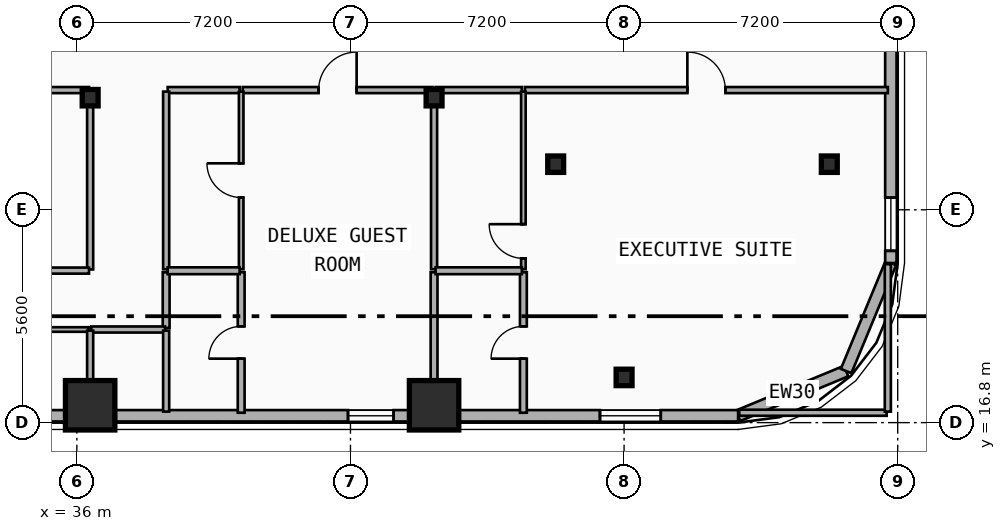
"""IFC4 building model, lengths in metres.
Left out: names, types, materials, properties, quantities, classifications, styles, units other than length and angle.
Written with IfcOpenShell. Run it as: python <this file> out.ifc"""

import sys

from ifc_helpers import new_model, si_unit, direction, frame, frame_2d, origin, origin_2d, place, context, subcontext, project, spatial, rectangle, i_section, extrude, element, fill, save


model = new_model("IFC4")
c1 = context("Model", 3, precision=1e-05, world=origin(), true_north=direction((0.0, 1.0)))
c2 = subcontext(c1, "Body", "Model", "MODEL_VIEW")
j1 = project(units=[si_unit("LENGTHUNIT", "METRE"), si_unit("PLANEANGLEUNIT", "RADIAN")], contexts=[c1])
p1 = place(None, origin())
s1 = spatial("IfcSite", under=j1, at=p1, CompositionType="ELEMENT")
p2 = place(p1, origin())
s2 = spatial("IfcBuilding", under=s1, at=p2, CompositionType="ELEMENT")
p3 = place(p2, frame((0.0, 0.0, 97.8)))
s3 = spatial("IfcBuildingStorey", under=s2, at=p3, CompositionType="ELEMENT", Elevation=97.8)
for number, where, z_axis, x_axis in (
    (1, (36.35, 25.35, 0.0), (0.0, 0.0, 1.0), (1.0, 0.0, 0.0)),
    (2, (45.4, 25.35, 0.0), (0.0, 0.0, 1.0), (1.0, 0.0, 0.0)),
):
    element("IfcColumn", number, at=place(p3, frame(where, z_axis=z_axis, x_axis=x_axis)), inside=s3, PredefinedType="COLUMN", context=c2, shape_type="SweptSolid", body=[
        extrude(i_section(OverallWidth=0.418, OverallDepth=0.432, WebThickness=0.035, FlangeThickness=0.056, FilletRadius=0.015, at=origin_2d()), origin(), (0.0, 0.0, 1.0), 3.5),
    ])
for number, where, z_axis, x_axis in (
    (3, (36.35, 17.365, 0.0), (0.0, -0.09, 0.996), (1.0, 0.0, 0.0)),
    (4, (45.4, 17.365, 0.0), (0.0, -0.09, 0.996), (1.0, 0.0, 0.0)),
):
    element("IfcColumn", number, at=place(p3, frame(where, z_axis=z_axis, x_axis=x_axis)), inside=s3, PredefinedType="COLUMN", context=c2, shape_type="SweptSolid", body=[
        extrude(rectangle(XDim=1.3, YDim=1.3, at=origin_2d()), origin(), (0.0, 0.0, 1.0), 3.514),
    ])
p4 = place(p3, frame((48.6, 23.6, 0.0), z_axis=(0.0, 0.0, 1.0), x_axis=(1.0, 0.0, 0.0)))
e5 = element("IfcColumn", 5, at=p4, inside=s3, PredefinedType="COLUMN", context=c2, shape_type="SweptSolid", body=[
    extrude(i_section(OverallWidth=0.418, OverallDepth=0.432, WebThickness=0.035, FlangeThickness=0.056, FilletRadius=0.015, at=origin_2d()), origin(), (0.0, 0.0, 1.0), 3.5),
])
p5 = place(p3, frame((50.4, 18.086, 0.0), z_axis=(0.0, -0.079891690793, 0.996803550226), x_axis=(1.0, 0.0, 0.0)))
e6 = element("IfcColumn", 6, at=p5, inside=s3, PredefinedType="COLUMN", context=c2, shape_type="SweptSolid", body=[
    extrude(i_section(OverallWidth=0.418, OverallDepth=0.432, WebThickness=0.035, FlangeThickness=0.056, FilletRadius=0.015, at=origin_2d()), origin(), (0.0, 0.0, 1.0), 3.511),
])
p6 = place(p3, frame((55.8, 23.6, 0.0), z_axis=(0.0, 0.0, 1.0), x_axis=(1.0, 0.0, 0.0)))
e7 = element("IfcColumn", 7, at=p6, inside=s3, PredefinedType="COLUMN", context=c2, shape_type="SweptSolid", body=[
    extrude(i_section(OverallWidth=0.418, OverallDepth=0.432, WebThickness=0.035, FlangeThickness=0.056, FilletRadius=0.015, at=origin_2d()), origin(), (0.0, 0.0, 1.0), 3.5),
])
p7 = place(p3, frame((56.243, 18.157, 0.0), z_axis=(0.0, 0.0, 1.0), x_axis=(-0.923882414032, -0.382676475685, 0.0)))
e8 = element("IfcWall", 8, at=p7, inside=s3, PredefinedType="SOLIDWALL", context=c2, shape_type="SweptSolid", body=[
    extrude(rectangle(XDim=3.077, YDim=0.3, at=frame_2d((1.539, 0.0))), origin(), (0.0, 0.0, 1.0), 3.24),
])
p8 = place(p3, frame((57.42, 21.0, 0.0), z_axis=(0.0, 0.0, 1.0), x_axis=(-0.382636798336, -0.92389884758, 0.0)))
e9 = element("IfcWall", 9, at=p8, inside=s3, PredefinedType="SOLIDWALL", context=c2, shape_type="SweptSolid", body=[
    extrude(rectangle(XDim=3.077, YDim=0.3, at=frame_2d((1.538, 0.0))), origin(), (0.0, 0.0, 1.0), 3.24),
])
p9 = place(p3, frame((57.42, 39.0, 0.0), z_axis=(0.0, 0.0, 1.0), x_axis=(0.0, -1.0, 0.0)))
e10 = element("IfcWall", 10, at=p9, inside=s3, PredefinedType="SOLIDWALL", context=c2, shape_type="SweptSolid", body=[
    extrude(rectangle(XDim=18.0, YDim=0.3, at=frame_2d((9.0, 0.0))), origin(), (0.0, 0.0, 1.0), 3.24),
])
p10 = place(p9, frame((8.882, 0.0, 0.48)))
e11 = element("IfcOpeningElement", 11, at=p10, cuts=e10, PredefinedType="OPENING", context=c2, shape_type="SweptSolid", body=[
    extrude(rectangle(XDim=1.4, YDim=1.8, at=frame_2d((0.7, 0.9))), frame((0.0, 0.16, 0.0), z_axis=(0.0, -1.0, 0.0), x_axis=(1.0, 0.0, 0.0)), (0.0, 0.0, 1.0), 0.32),
])
p11 = place(p9, frame((3.621, 0.0, 0.48)))
e12 = element("IfcOpeningElement", 12, at=p11, cuts=e10, PredefinedType="OPENING", context=c2, shape_type="SweptSolid", body=[
    extrude(rectangle(XDim=1.4, YDim=1.8, at=frame_2d((0.7, 0.9))), frame((0.0, 0.16, 0.0), z_axis=(0.0, -1.0, 0.0), x_axis=(1.0, 0.0, 0.0)), (0.0, 0.0, 1.0), 0.32),
])
p12 = place(p9, frame((16.28, 0.0, 0.65)))
e13 = element("IfcOpeningElement", 13, at=p12, cuts=e10, PredefinedType="OPENING", context=c2, shape_type="SweptSolid", body=[
    extrude(rectangle(XDim=1.4, YDim=1.8, at=frame_2d((0.7, 0.9))), frame((0.0, 0.16, 0.0), z_axis=(0.0, -1.0, 0.0), x_axis=(1.0, 0.0, 0.0)), (0.0, 0.0, 1.0), 0.32),
])
p13 = place(p3, frame((53.4, 16.98, 0.0), z_axis=(0.0, 0.0, 1.0), x_axis=(-1.0, 0.0, 0.0)))
e14 = element("IfcWall", 14, at=p13, inside=s3, PredefinedType="SOLIDWALL", context=c2, shape_type="SweptSolid", body=[
    extrude(rectangle(XDim=49.2, YDim=0.3, at=frame_2d((24.6, 0.0))), origin(), (0.0, 0.0, 1.0), 2.86),
])
p14 = place(p13, frame((45.565, 0.0, 0.48)))
e15 = element("IfcOpeningElement", 15, at=p14, cuts=e14, PredefinedType="OPENING", context=c2, shape_type="SweptSolid", body=[
    extrude(rectangle(XDim=1.6, YDim=1.95, at=frame_2d((0.8, 0.975))), frame((0.0, 0.16, 0.0), z_axis=(0.0, -1.0, 0.0), x_axis=(1.0, 0.0, 0.0)), (0.0, 0.0, 1.0), 0.32),
])
p15 = place(p13, frame((33.165, 0.0, 0.48)))
e16 = element("IfcOpeningElement", 16, at=p15, cuts=e14, PredefinedType="OPENING", context=c2, shape_type="SweptSolid", body=[
    extrude(rectangle(XDim=1.2, YDim=1.5, at=frame_2d((0.6, 0.75))), frame((0.0, 0.16, 0.0), z_axis=(0.0, -1.0, 0.0), x_axis=(1.0, 0.0, 0.0)), (0.0, 0.0, 1.0), 0.32),
])
p16 = place(p13, frame((20.025, 0.0, 0.73)))
e17 = element("IfcOpeningElement", 17, at=p16, cuts=e14, PredefinedType="OPENING", context=c2, shape_type="SweptSolid", body=[
    extrude(rectangle(XDim=1.6, YDim=1.95, at=frame_2d((0.8, 0.975))), frame((0.0, 0.16, 0.0), z_axis=(0.0, -1.0, 0.0), x_axis=(1.0, 0.0, 0.0)), (0.0, 0.0, 1.0), 0.32),
])
p17 = place(p13, frame((9.065, 0.0, 0.48)))
e18 = element("IfcOpeningElement", 18, at=p17, cuts=e14, PredefinedType="OPENING", context=c2, shape_type="SweptSolid", body=[
    extrude(rectangle(XDim=1.2, YDim=1.5, at=frame_2d((0.6, 0.75))), frame((0.0, 0.16, 0.0), z_axis=(0.0, -1.0, 0.0), x_axis=(1.0, 0.0, 0.0)), (0.0, 0.0, 1.0), 0.32),
])
p18 = place(p13, frame((2.035, 0.0, 0.48)))
e19 = element("IfcOpeningElement", 19, at=p18, cuts=e14, PredefinedType="OPENING", context=c2, shape_type="SweptSolid", body=[
    extrude(rectangle(XDim=1.6, YDim=1.95, at=frame_2d((0.8, 0.975))), frame((0.0, 0.16, 0.0), z_axis=(0.0, -1.0, 0.0), x_axis=(1.0, 0.0, 0.0)), (0.0, 0.0, 1.0), 0.32),
])
p19 = place(p3, frame((40.364, 25.55, 0.0), z_axis=(0.0, 0.0, 1.0), x_axis=(1.0, 0.0, 0.0)))
e20 = element("IfcWall", 20, at=p19, inside=s3, PredefinedType="PARTITIONING", context=c2, shape_type="SweptSolid", body=[
    extrude(rectangle(XDim=4.996, YDim=0.16, at=frame_2d((2.498, 0.0))), origin(), (0.0, 0.0, 1.0), 2.31),
])
p20 = place(p19, frame((1.998, 0.0, 0.0)))
e21 = element("IfcOpeningElement", 21, at=p20, cuts=e20, PredefinedType="OPENING", context=c2, shape_type="SweptSolid", body=[
    extrude(rectangle(XDim=1.0, YDim=2.15, at=frame_2d((0.5, 1.075))), frame((0.0, 0.09, 0.0), z_axis=(0.0, -1.0, 0.0), x_axis=(1.0, 0.0, 0.0)), (0.0, 0.0, 1.0), 0.18),
])
p21 = place(p3, frame((38.39, 25.55, 0.0), z_axis=(0.0, 0.0, 1.0), x_axis=(1.0, 0.0, 0.0)))
e22 = element("IfcWall", 22, at=p21, inside=s3, PredefinedType="PARTITIONING", context=c2, shape_type="SweptSolid", body=[
    extrude(rectangle(XDim=1.894, YDim=0.16, at=frame_2d((0.947, 0.0))), origin(), (0.0, 0.0, 1.0), 3.24),
])
p22 = place(p3, frame((47.79, 25.55, 0.0), z_axis=(0.0, 0.0, 1.0), x_axis=(1.0, 0.0, 0.0)))
e23 = element("IfcWall", 23, at=p22, inside=s3, PredefinedType="PARTITIONING", context=c2, shape_type="SweptSolid", body=[
    extrude(rectangle(XDim=9.55, YDim=0.16, at=frame_2d((4.775, 0.0))), origin(), (0.0, 0.0, 1.0), 2.57),
])
p23 = place(p22, frame((4.275, 0.0, 0.0)))
e24 = element("IfcOpeningElement", 24, at=p23, cuts=e23, PredefinedType="OPENING", context=c2, shape_type="SweptSolid", body=[
    extrude(rectangle(XDim=1.0, YDim=2.15, at=frame_2d((0.5, 1.075))), frame((0.0, 0.09, 0.0), z_axis=(0.0, -1.0, 0.0), x_axis=(1.0, 0.0, 0.0)), (0.0, 0.0, 1.0), 0.18),
])
p24 = place(p3, frame((45.44, 25.55, 0.0), z_axis=(0.0, 0.0, 1.0), x_axis=(1.0, 0.0, 0.0)))
e25 = element("IfcWall", 25, at=p24, inside=s3, PredefinedType="PARTITIONING", context=c2, shape_type="SweptSolid", body=[
    extrude(rectangle(XDim=2.27, YDim=0.16, at=frame_2d((1.135, 0.0))), origin(), (0.0, 0.0, 1.0), 2.31),
])
p25 = place(p3, frame((38.35, 19.29, 0.0), z_axis=(0.0, 0.0, 1.0), x_axis=(0.0, 1.0, 0.0)))
e26 = element("IfcWall", 26, at=p25, inside=s3, PredefinedType="PLUMBINGWALL", context=c2, shape_type="SweptSolid", body=[
    extrude(rectangle(XDim=1.466, YDim=0.18, at=frame_2d((0.733, 0.0))), origin(), (0.0, 0.0, 1.0), 2.82),
])
p26 = place(p3, frame((38.35, 20.836, 0.0), z_axis=(0.0, 0.0, 1.0), x_axis=(0.0, 1.0, 0.0)))
e27 = element("IfcWall", 27, at=p26, inside=s3, PredefinedType="PARTITIONING", context=c2, shape_type="SweptSolid", body=[
    extrude(rectangle(XDim=4.674, YDim=0.16, at=frame_2d((2.337, 0.0))), origin(), (0.0, 0.0, 1.0), 2.82),
])
p27 = place(p3, frame((22.84, 19.25, 0.0), z_axis=(0.0, 0.0, 1.0), x_axis=(1.0, 0.0, 0.0)))
e28 = element("IfcWall", 28, at=p27, inside=s3, PredefinedType="PARTITIONING", context=c2, shape_type="SweptSolid", body=[
    extrude(rectangle(XDim=13.47, YDim=0.12, at=frame_2d((6.735, 0.0))), origin(), (0.0, 0.0, 1.0), 2.31),
])
p28 = place(p27, frame((0.652, 0.0, 0.0)))
e29 = element("IfcOpeningElement", 29, at=p28, cuts=e28, PredefinedType="OPENING", context=c2, shape_type="SweptSolid", body=[
    extrude(rectangle(XDim=0.9, YDim=2.1, at=frame_2d((0.45, 1.05))), frame((0.0, 0.07, 0.0), z_axis=(0.0, -1.0, 0.0), x_axis=(1.0, 0.0, 0.0)), (0.0, 0.0, 1.0), 0.14),
])
p29 = place(p3, frame((40.324, 17.06, 0.0), z_axis=(0.0, 0.0, 1.0), x_axis=(0.0, 1.0, 0.0)))
e30 = element("IfcWall", 30, at=p29, inside=s3, PredefinedType="PLUMBINGWALL", context=c2, shape_type="SweptSolid", body=[
    extrude(rectangle(XDim=3.696, YDim=0.18, at=frame_2d((1.848, 0.0))), origin(), (0.0, 0.0, 1.0), 2.82),
])
p30 = place(p29, frame((1.423, 0.0, 0.0)))
e31 = element("IfcOpeningElement", 31, at=p30, cuts=e30, PredefinedType="OPENING", context=c2, shape_type="SweptSolid", body=[
    extrude(rectangle(XDim=0.85, YDim=2.1, at=frame_2d((0.425, 1.05))), frame((0.0, 0.1, 0.0), z_axis=(0.0, -1.0, 0.0), x_axis=(1.0, 0.0, 0.0)), (0.0, 0.0, 1.0), 0.2),
])
p31 = place(p3, frame((40.324, 20.836, 0.0), z_axis=(0.0, 0.0, 1.0), x_axis=(0.0, 1.0, 0.0)))
e32 = element("IfcWall", 32, at=p31, inside=s3, PredefinedType="PARTITIONING", context=c2, shape_type="SweptSolid", body=[
    extrude(rectangle(XDim=4.674, YDim=0.12, at=frame_2d((2.337, 0.0))), origin(), (0.0, 0.0, 1.0), 2.82),
])
p32 = place(p31, frame((1.887, 0.0, 0.0)))
e33 = element("IfcOpeningElement", 33, at=p32, cuts=e32, PredefinedType="OPENING", context=c2, shape_type="SweptSolid", body=[
    extrude(rectangle(XDim=0.9, YDim=2.1, at=frame_2d((0.45, 1.05))), frame((0.0, 0.07, 0.0), z_axis=(0.0, -1.0, 0.0), x_axis=(1.0, 0.0, 0.0)), (0.0, 0.0, 1.0), 0.14),
])
p33 = place(p3, frame((45.4, 17.06, 0.0), z_axis=(0.0, 0.0, 1.0), x_axis=(0.0, 1.0, 0.0)))
e34 = element("IfcWall", 34, at=p33, inside=s3, PredefinedType="PLUMBINGWALL", context=c2, shape_type="SweptSolid", body=[
    extrude(rectangle(XDim=3.696, YDim=0.18, at=frame_2d((1.848, 0.0))), origin(), (0.0, 0.0, 1.0), 2.31),
])
p34 = place(p3, frame((45.4, 20.836, 0.0), z_axis=(0.0, 0.0, 1.0), x_axis=(0.0, 1.0, 0.0)))
e35 = element("IfcWall", 35, at=p34, inside=s3, PredefinedType="PARTITIONING", context=c2, shape_type="SweptSolid", body=[
    extrude(rectangle(XDim=4.674, YDim=0.16, at=frame_2d((2.337, 0.0))), origin(), (0.0, 0.0, 1.0), 2.31),
])
p35 = place(p3, frame((38.39, 20.796, 0.0), z_axis=(0.0, 0.0, 1.0), x_axis=(1.0, 0.0, 0.0)))
e36 = element("IfcWall", 36, at=p35, inside=s3, PredefinedType="PLUMBINGWALL", context=c2, shape_type="SweptSolid", body=[
    extrude(rectangle(XDim=1.894, YDim=0.18, at=frame_2d((0.947, 0.0))), origin(), (0.0, 0.0, 1.0), 2.82),
])
p36 = place(p3, frame((47.75, 17.06, 0.0), z_axis=(0.0, 0.0, 1.0), x_axis=(0.0, 1.0, 0.0)))
e37 = element("IfcWall", 37, at=p36, inside=s3, PredefinedType="PLUMBINGWALL", context=c2, shape_type="SweptSolid", body=[
    extrude(rectangle(XDim=3.696, YDim=0.18, at=frame_2d((1.848, 0.0))), origin(), (0.0, 0.0, 1.0), 2.86),
])
p37 = place(p36, frame((1.423, 0.0, 0.0)))
e38 = element("IfcOpeningElement", 38, at=p37, cuts=e37, PredefinedType="OPENING", context=c2, shape_type="SweptSolid", body=[
    extrude(rectangle(XDim=0.85, YDim=2.1, at=frame_2d((0.425, 1.05))), frame((0.0, 0.1, 0.0), z_axis=(0.0, -1.0, 0.0), x_axis=(1.0, 0.0, 0.0)), (0.0, 0.0, 1.0), 0.2),
])
p38 = place(p3, frame((47.75, 20.836, 0.0), z_axis=(0.0, 0.0, 1.0), x_axis=(0.0, 1.0, 0.0)))
e39 = element("IfcWall", 39, at=p38, inside=s3, PredefinedType="PARTITIONING", context=c2, shape_type="SweptSolid", body=[
    extrude(rectangle(XDim=4.674, YDim=0.12, at=frame_2d((2.337, 0.0))), origin(), (0.0, 0.0, 1.0), 2.72),
])
p39 = place(p38, frame((0.286, 0.0, 0.0)))
e40 = element("IfcOpeningElement", 40, at=p39, cuts=e39, PredefinedType="OPENING", context=c2, shape_type="SweptSolid", body=[
    extrude(rectangle(XDim=0.9, YDim=2.1, at=frame_2d((0.45, 1.05))), frame((0.0, 0.07, 0.0), z_axis=(0.0, -1.0, 0.0), x_axis=(1.0, 0.0, 0.0)), (0.0, 0.0, 1.0), 0.14),
])
p40 = place(p3, frame((45.44, 20.796, 0.0), z_axis=(0.0, 0.0, 1.0), x_axis=(1.0, 0.0, 0.0)))
e41 = element("IfcWall", 41, at=p40, inside=s3, PredefinedType="PLUMBINGWALL", context=c2, shape_type="SweptSolid", body=[
    extrude(rectangle(XDim=2.27, YDim=0.18, at=frame_2d((1.135, 0.0))), origin(), (0.0, 0.0, 1.0), 2.31),
])
p41 = place(p3, frame((22.83, 25.55, 0.0), z_axis=(0.0, 0.0, 1.0), x_axis=(1.0, 0.0, 0.0)))
e42 = element("IfcWall", 42, at=p41, inside=s3, PredefinedType="PARTITIONING", context=c2, shape_type="SweptSolid", body=[
    extrude(rectangle(XDim=13.49, YDim=0.16, at=frame_2d((6.745, 0.0))), origin(), (0.0, 0.0, 1.0), 2.31),
])
p42 = place(p3, frame((36.38, 19.25, 0.0), z_axis=(0.0, 0.0, 1.0), x_axis=(1.0, 0.0, 0.0)))
e43 = element("IfcWall", 43, at=p42, inside=s3, PredefinedType="PARTITIONING", context=c2, shape_type="SweptSolid", body=[
    extrude(rectangle(XDim=1.94, YDim=0.16, at=frame_2d((0.97, 0.0))), origin(), (0.0, 0.0, 1.0), 2.31),
])
p43 = place(p3, frame((36.35, 20.83, 0.0), z_axis=(0.0, 0.0, 1.0), x_axis=(0.0, 1.0, 0.0)))
e44 = element("IfcWall", 44, at=p43, inside=s3, PredefinedType="PARTITIONING", context=c2, shape_type="SweptSolid", body=[
    extrude(rectangle(XDim=4.69, YDim=0.16, at=frame_2d((2.345, 0.0))), origin(), (0.0, 0.0, 1.0), 2.31),
])
p44 = place(p3, frame((34.48, 20.8, 0.0), z_axis=(0.0, 0.0, 1.0), x_axis=(1.0, 0.0, 0.0)))
e45 = element("IfcWall", 45, at=p44, inside=s3, PredefinedType="PARTITIONING", context=c2, shape_type="SweptSolid", body=[
    extrude(rectangle(XDim=1.84, YDim=0.16, at=frame_2d((0.92, 0.0))), origin(), (0.0, 0.0, 1.0), 2.31),
])
p45 = place(p3, frame((36.35, 17.09, 0.0), z_axis=(0.0, 0.0, 1.0), x_axis=(0.0, 1.0, 0.0)))
e46 = element("IfcWall", 46, at=p45, inside=s3, PredefinedType="PARTITIONING", context=c2, shape_type="SweptSolid", body=[
    extrude(rectangle(XDim=2.13, YDim=0.16, at=frame_2d((1.065, 0.0))), origin(), (0.0, 0.0, 1.0), 2.31),
])
p46 = place(p3, frame((38.35, 17.09, 0.0), z_axis=(0.0, 0.0, 1.0), x_axis=(0.0, 1.0, 0.0)))
e47 = element("IfcWall", 47, at=p46, inside=s3, PredefinedType="PARTITIONING", context=c2, shape_type="SweptSolid", body=[
    extrude(rectangle(XDim=2.13, YDim=0.16, at=frame_2d((1.065, 0.0))), origin(), (0.0, 0.0, 1.0), 2.86),
])
p47 = place(p3, frame((53.43, 17.06, 0.0), z_axis=(0.0, 0.0, 1.0), x_axis=(1.0, 0.0, 0.0)))
e48 = element("IfcWall", 48, at=p47, inside=s3, PredefinedType="PARTITIONING", context=c2, shape_type="SweptSolid", body=[
    extrude(rectangle(XDim=3.88, YDim=0.16, at=frame_2d((1.94, 0.0))), origin(), (0.0, 0.0, 1.0), 3.24),
])
p48 = place(p3, frame((57.34, 17.09, 0.0), z_axis=(0.0, 0.0, 1.0), x_axis=(0.0, 1.0, 0.0)))
e49 = element("IfcWall", 49, at=p48, inside=s3, PredefinedType="PARTITIONING", context=c2, shape_type="SweptSolid", body=[
    extrude(rectangle(XDim=3.88, YDim=0.16, at=frame_2d((1.94, 0.0))), origin(), (0.0, 0.0, 1.0), 3.24),
])
p49 = place(p12, origin())
e50 = element("IfcWindow", 50, at=p49, inside=s3, PartitioningType="SINGLE_PANEL", PredefinedType="WINDOW", context=c2, shape_type="SweptSolid", body=[
    extrude(rectangle(XDim=1.4, YDim=1.8, at=frame_2d((0.7, 0.9))), frame((0.0, 0.03, 0.0), z_axis=(0.0, -1.0, 0.0), x_axis=(1.0, 0.0, 0.0)), (0.0, 0.0, 1.0), 0.06),
])
fill(e13, e50)
p50 = place(p17, origin())
e51 = element("IfcWindow", 51, at=p50, inside=s3, PartitioningType="SINGLE_PANEL", PredefinedType="WINDOW", context=c2, shape_type="SweptSolid", body=[
    extrude(rectangle(XDim=1.2, YDim=1.5, at=frame_2d((0.6, 0.75))), frame((0.0, 0.03, 0.0), z_axis=(0.0, -1.0, 0.0), x_axis=(1.0, 0.0, 0.0)), (0.0, 0.0, 1.0), 0.06),
])
fill(e18, e51)
p51 = place(p18, origin())
e52 = element("IfcWindow", 52, at=p51, inside=s3, PartitioningType="SINGLE_PANEL", PredefinedType="WINDOW", context=c2, shape_type="SweptSolid", body=[
    extrude(rectangle(XDim=1.6, YDim=1.95, at=frame_2d((0.8, 0.975))), frame((0.0, 0.03, 0.0), z_axis=(0.0, -1.0, 0.0), x_axis=(1.0, 0.0, 0.0)), (0.0, 0.0, 1.0), 0.06),
])
fill(e19, e52)
p52 = place(p20, origin())
e53 = element("IfcDoor", 53, at=p52, inside=s3, OperationType="SINGLE_SWING_RIGHT", PredefinedType="DOOR", context=c2, shape_type="SweptSolid", body=[
    extrude(rectangle(XDim=1.0, YDim=2.15, at=frame_2d((0.5, 1.075))), frame((0.0, 0.025, 0.0), z_axis=(0.0, -1.0, 0.0), x_axis=(1.0, 0.0, 0.0)), (0.0, 0.0, 1.0), 0.05),
])
fill(e21, e53)
p53 = place(p23, origin())
e54 = element("IfcDoor", 54, at=p53, inside=s3, OperationType="SINGLE_SWING_LEFT", PredefinedType="DOOR", context=c2, shape_type="SweptSolid", body=[
    extrude(rectangle(XDim=1.0, YDim=2.15, at=frame_2d((0.5, 1.075))), frame((0.0, 0.025, 0.0), z_axis=(0.0, -1.0, 0.0), x_axis=(1.0, 0.0, 0.0)), (0.0, 0.0, 1.0), 0.05),
])
fill(e24, e54)
p54 = place(p30, origin())
e55 = element("IfcDoor", 55, at=p54, inside=s3, OperationType="SINGLE_SWING_LEFT", PredefinedType="DOOR", context=c2, shape_type="SweptSolid", body=[
    extrude(rectangle(XDim=0.85, YDim=2.1, at=frame_2d((0.425, 1.05))), frame((0.0, 0.025, 0.0), z_axis=(0.0, -1.0, 0.0), x_axis=(1.0, 0.0, 0.0)), (0.0, 0.0, 1.0), 0.05),
])
fill(e31, e55)
p55 = place(p32, origin())
e56 = element("IfcDoor", 56, at=p55, inside=s3, OperationType="SINGLE_SWING_RIGHT", PredefinedType="DOOR", context=c2, shape_type="SweptSolid", body=[
    extrude(rectangle(XDim=0.9, YDim=2.1, at=frame_2d((0.45, 1.05))), frame((0.0, 0.025, 0.0), z_axis=(0.0, -1.0, 0.0), x_axis=(1.0, 0.0, 0.0)), (0.0, 0.0, 1.0), 0.05),
])
fill(e33, e56)
p56 = place(p37, origin())
e57 = element("IfcDoor", 57, at=p56, inside=s3, OperationType="SINGLE_SWING_LEFT", PredefinedType="DOOR", context=c2, shape_type="SweptSolid", body=[
    extrude(rectangle(XDim=0.85, YDim=2.1, at=frame_2d((0.425, 1.05))), frame((0.0, 0.025, 0.0), z_axis=(0.0, -1.0, 0.0), x_axis=(1.0, 0.0, 0.0)), (0.0, 0.0, 1.0), 0.05),
])
fill(e38, e57)
p57 = place(p39, origin())
e58 = element("IfcDoor", 58, at=p57, inside=s3, OperationType="SINGLE_SWING_RIGHT", PredefinedType="DOOR", context=c2, shape_type="SweptSolid", body=[
    extrude(rectangle(XDim=0.9, YDim=2.1, at=frame_2d((0.45, 1.05))), frame((0.0, 0.025, 0.0), z_axis=(0.0, -1.0, 0.0), x_axis=(1.0, 0.0, 0.0)), (0.0, 0.0, 1.0), 0.05),
])
fill(e40, e58)
save(model, sys.argv[1])
